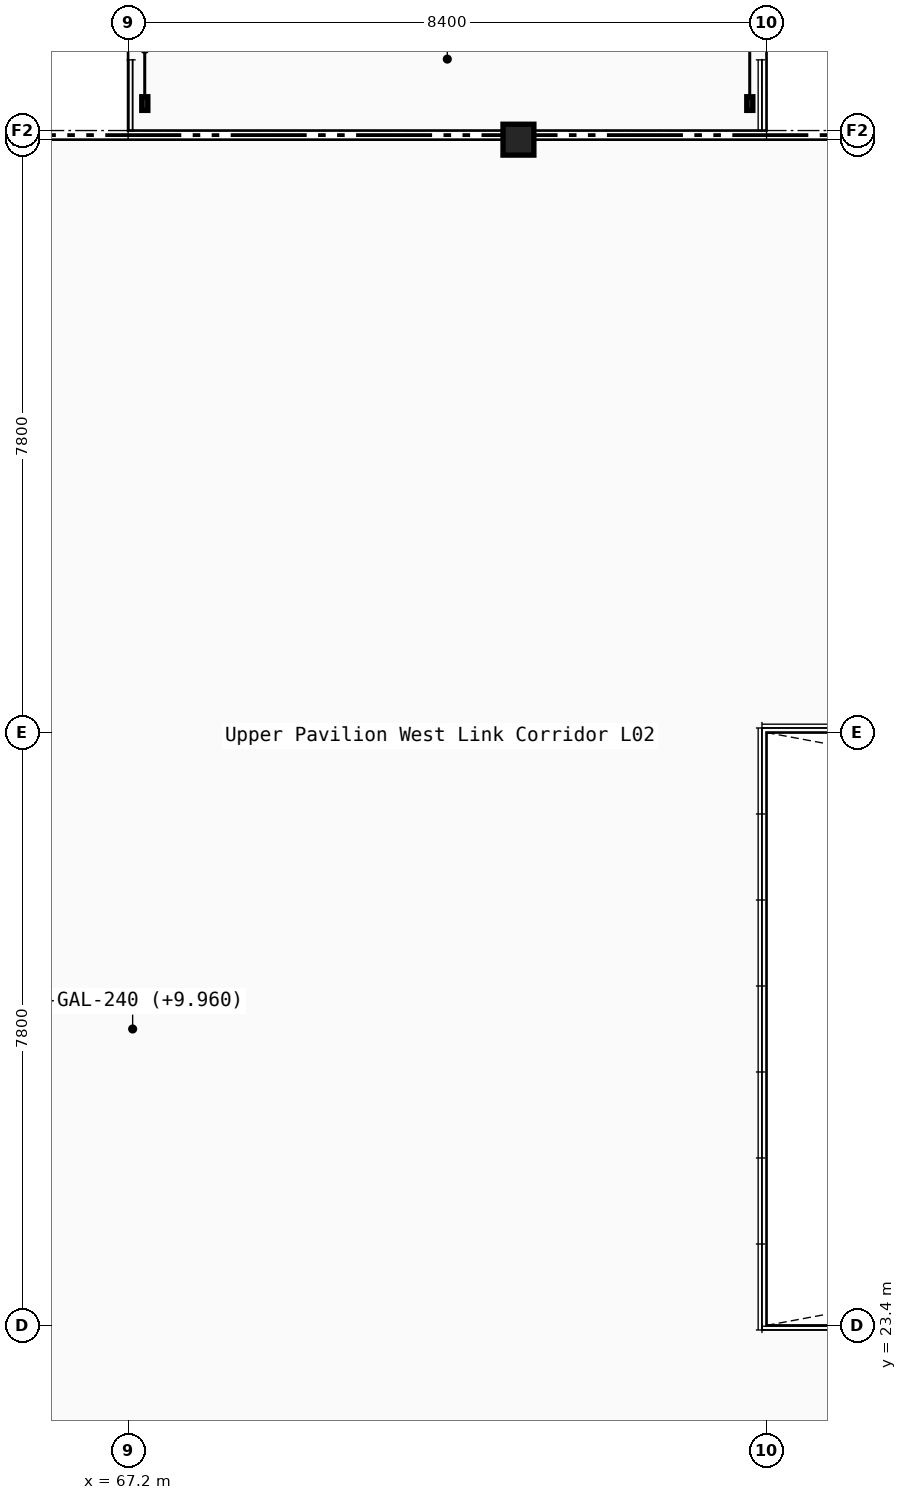
"""IFC4 building model, lengths in metres.
Left out: names, types, materials, properties, quantities, classifications, styles, units other than length and angle.
Written with IfcOpenShell. Run it as: python <this file> out.ifc"""

import sys

from ifc_helpers import new_model, si_unit, direction, frame, origin, origin_2d, place, context, subcontext, project, spatial, hollow_circle, extrude, element, save


model = new_model("IFC4")
c1 = context("Model", 3, precision=1e-05, world=origin(), true_north=direction((0.0, 1.0)))
c2 = subcontext(c1, "Body", "Model", "MODEL_VIEW")
j1 = project(units=[si_unit("LENGTHUNIT", "METRE"), si_unit("PLANEANGLEUNIT", "RADIAN")], contexts=[c1])
p1 = place(None, origin())
s1 = spatial("IfcSite", under=j1, at=p1, CompositionType="ELEMENT")
p2 = place(p1, origin())
s2 = spatial("IfcBuilding", under=s1, at=p2, CompositionType="ELEMENT")
p3 = place(p2, frame((0.0, 0.0, 10.2)))
s3 = spatial("IfcBuildingStorey", under=s2, at=p3, CompositionType="ELEMENT", Elevation=10.2)
p4 = place(p3, frame((72.336, 39.0, 0.0), z_axis=(0.0, 0.0, 1.0), x_axis=(1.0, 0.0, 0.0)))
e1 = element("IfcColumn", 1, at=p4, inside=s3, PredefinedType="COLUMN", context=c2, shape_type="SweptSolid", body=[
    extrude(hollow_circle(Radius=0.203, WallThickness=0.02, at=origin_2d()), origin(), (0.0, 0.0, 1.0), 4.65),
])
save(model, sys.argv[1])
